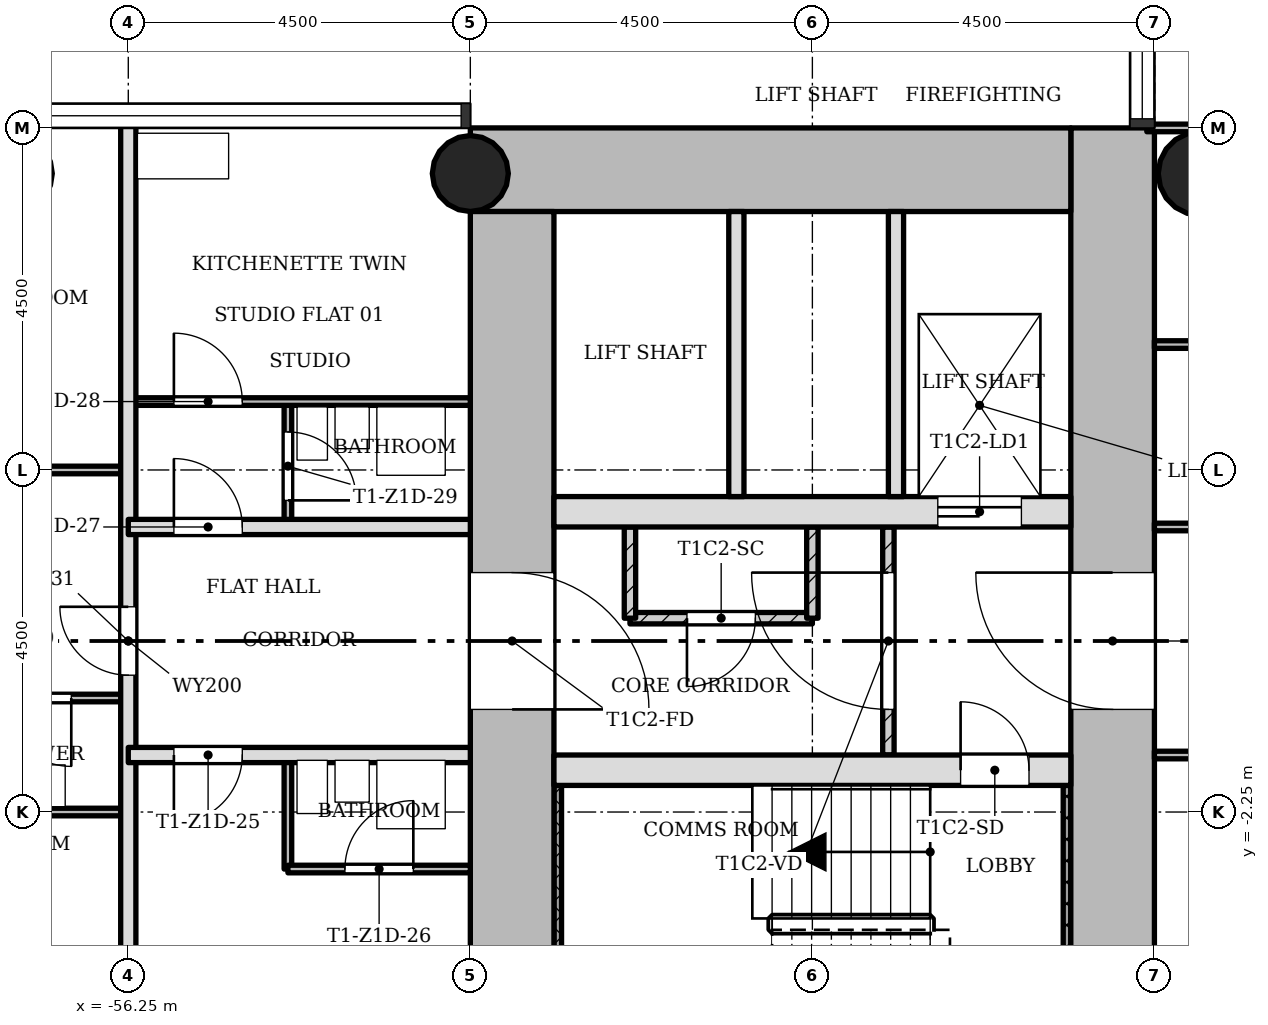
"""IFC4 building model, lengths in metres.
Left out: names, types, materials, properties, quantities, classifications, styles, units other than length and angle.
Written with IfcOpenShell. Run it as: python <this file> out.ifc"""

import sys

from ifc_helpers import new_model, si_unit, direction, frame, frame_2d, origin, origin_2d, place, context, subcontext, project, spatial, rectangle, hollow_circle, extrude, element, fill, save


model = new_model("IFC4")
c1 = context("Model", 3, precision=1e-05, world=origin(), true_north=direction((0.0, 1.0)))
c2 = subcontext(c1, "Body", "Model", "MODEL_VIEW")
j1 = project(units=[si_unit("LENGTHUNIT", "METRE"), si_unit("PLANEANGLEUNIT", "RADIAN")], contexts=[c1])
p1 = place(None, origin())
s1 = spatial("IfcSite", under=j1, at=p1, CompositionType="ELEMENT")
p2 = place(p1, origin())
s2 = spatial("IfcBuilding", under=s1, at=p2, CompositionType="ELEMENT")
p3 = place(p2, frame((0.0, 0.0, 61.9)))
s3 = spatial("IfcBuildingStorey", under=s2, at=p3, CompositionType="ELEMENT", Elevation=61.9)
p4 = place(p3, frame((-43.3, -5.65, 0.0), z_axis=(0.0, 0.0, 1.0), x_axis=(0.0, 1.0, 0.0)))
e1 = element("IfcWall", 1, at=p4, inside=s3, PredefinedType="SHEAR", context=c2, shape_type="SweptSolid", body=[
    extrude(rectangle(XDim=12.4, YDim=1.1, at=frame_2d((6.2, 0.0))), origin(), (0.0, 0.0, 1.0), 3.4),
])
p5 = place(p4, frame((4.75, 0.0, 0.0)))
e2 = element("IfcOpeningElement", 2, at=p5, cuts=e1, PredefinedType="OPENING", context=c2, shape_type="SweptSolid", body=[
    extrude(rectangle(XDim=1.8, YDim=2.1, at=frame_2d((0.9, 1.05))), frame((0.0, 0.56, 0.0), z_axis=(0.0, -1.0, 0.0), x_axis=(1.0, 0.0, 0.0)), (0.0, 0.0, 1.0), 1.12),
])
p6 = place(p3, frame((-43.85, 6.2, 0.0), z_axis=(0.0, 0.0, 1.0), x_axis=(-1.0, 0.0, 0.0)))
e3 = element("IfcWall", 3, at=p6, inside=s3, PredefinedType="SHEAR", context=c2, shape_type="SweptSolid", body=[
    extrude(rectangle(XDim=7.9, YDim=1.1, at=frame_2d((3.95, 0.0))), origin(), (0.0, 0.0, 1.0), 3.4),
])
p7 = place(p3, frame((-51.2, 5.65, 0.0), z_axis=(0.0, 0.0, 1.0), x_axis=(0.0, -1.0, 0.0)))
e4 = element("IfcWall", 4, at=p7, inside=s3, PredefinedType="SHEAR", context=c2, shape_type="SweptSolid", body=[
    extrude(rectangle(XDim=12.4, YDim=1.1, at=frame_2d((6.2, 0.0))), origin(), (0.0, 0.0, 1.0), 3.4),
])
p8 = place(p7, frame((4.75, 0.0, 0.0)))
e5 = element("IfcOpeningElement", 5, at=p8, cuts=e4, PredefinedType="OPENING", context=c2, shape_type="SweptSolid", body=[
    extrude(rectangle(XDim=1.8, YDim=2.1, at=frame_2d((0.9, 1.05))), frame((0.0, 0.56, 0.0), z_axis=(0.0, -1.0, 0.0), x_axis=(1.0, 0.0, 0.0)), (0.0, 0.0, 1.0), 1.12),
])
p9 = place(p3, frame((-50.65, -1.7, 0.0), z_axis=(0.0, 0.0, 1.0), x_axis=(1.0, 0.0, 0.0)))
e6 = element("IfcWall", 6, at=p9, inside=s3, PredefinedType="SHEAR", context=c2, shape_type="SweptSolid", body=[
    extrude(rectangle(XDim=6.8, YDim=0.4, at=frame_2d((3.4, 0.0))), origin(), (0.0, 0.0, 1.0), 3.4),
])
p10 = place(p9, frame((5.35, 0.0, 0.0)))
e7 = element("IfcOpeningElement", 7, at=p10, cuts=e6, PredefinedType="OPENING", context=c2, shape_type="SweptSolid", body=[
    extrude(rectangle(XDim=0.9, YDim=2.1, at=frame_2d((0.45, 1.05))), frame((0.0, 0.21, 0.0), z_axis=(0.0, -1.0, 0.0), x_axis=(1.0, 0.0, 0.0)), (0.0, 0.0, 1.0), 0.42),
])
p11 = place(p3, frame((-50.65, 1.7, 0.0), z_axis=(0.0, 0.0, 1.0), x_axis=(1.0, 0.0, 0.0)))
e8 = element("IfcWall", 8, at=p11, inside=s3, PredefinedType="SHEAR", context=c2, shape_type="SweptSolid", body=[
    extrude(rectangle(XDim=6.8, YDim=0.4, at=frame_2d((3.4, 0.0))), origin(), (0.0, 0.0, 1.0), 3.4),
])
p12 = place(p11, frame((5.05, 0.0, 0.0)))
e9 = element("IfcOpeningElement", 9, at=p12, cuts=e8, PredefinedType="OPENING", context=c2, shape_type="SweptSolid", body=[
    extrude(rectangle(XDim=1.1, YDim=2.1, at=frame_2d((0.55, 1.05))), frame((0.0, 0.21, 0.0), z_axis=(0.0, -1.0, 0.0), x_axis=(1.0, 0.0, 0.0)), (0.0, 0.0, 1.0), 0.42),
])
p13 = place(p3, frame((-51.75, 6.15, 0.0), z_axis=(0.0, 0.0, 1.0), x_axis=(1.0, 0.0, 0.0)))
e10 = element("IfcColumn", 10, at=p13, inside=s3, PredefinedType="COLUMN", context=c2, shape_type="SweptSolid", body=[
    extrude(hollow_circle(Radius=0.5, WallThickness=0.036, at=origin_2d()), origin(), (0.0, 0.0, 1.0), 3.4),
])
p14 = place(p3, frame((-42.15, 6.15, 0.0), z_axis=(0.0, 0.0, 1.0), x_axis=(1.0, 0.0, 0.0)))
e11 = element("IfcColumn", 11, at=p14, inside=s3, PredefinedType="COLUMN", context=c2, shape_type="SweptSolid", body=[
    extrude(hollow_circle(Radius=0.55, WallThickness=0.04, at=origin_2d()), origin(), (0.0, 0.0, 1.0), 3.4),
])
p15 = place(p3, frame((-46.25, 1.5, 0.0), z_axis=(0.0, 0.0, 1.0), x_axis=(0.0, -1.0, 0.0)))
e12 = element("IfcWall", 12, at=p15, inside=s3, PredefinedType="PARTITIONING", context=c2, shape_type="SweptSolid", body=[
    extrude(rectangle(XDim=3.0, YDim=0.15, at=frame_2d((1.5, 0.0))), origin(), (0.0, 0.0, 1.0), 3.0),
])
p16 = place(p15, frame((0.6, 0.0, 0.0)))
e13 = element("IfcOpeningElement", 13, at=p16, cuts=e12, PredefinedType="OPENING", context=c2, shape_type="SweptSolid", body=[
    extrude(rectangle(XDim=1.8, YDim=2.1, at=frame_2d((0.9, 1.05))), frame((0.0, 0.085, 0.0), z_axis=(0.0, -1.0, 0.0), x_axis=(1.0, 0.0, 0.0)), (0.0, 0.0, 1.0), 0.17),
])
for number, where, z_axis, x_axis in (
    (14, (-46.15, 5.65, 0.0), (0.0, 0.0, 1.0), (0.0, -1.0, 0.0)),
    (15, (-48.25, 5.65, 0.0), (0.0, 0.0, 1.0), (0.0, -1.0, 0.0)),
):
    element("IfcWall", number, at=place(p3, frame(where, z_axis=z_axis, x_axis=x_axis)), inside=s3, PredefinedType="SOLIDWALL", context=c2, shape_type="SweptSolid", body=[
        extrude(rectangle(XDim=3.75, YDim=0.2, at=frame_2d((1.875, 0.0))), origin(), (0.0, 0.0, 1.0), 3.0),
    ])
p17 = place(p3, frame((-47.25, 0.3, 0.0), z_axis=(0.0, 0.0, 1.0), x_axis=(-1.0, 0.0, 0.0)))
e16 = element("IfcWall", 16, at=p17, inside=s3, PredefinedType="PARTITIONING", context=c2, shape_type="SweptSolid", body=[
    extrude(rectangle(XDim=2.4, YDim=0.15, at=frame_2d((1.2, 0.0))), origin(), (0.0, 0.0, 1.0), 3.0),
])
p18 = place(p17, frame((0.75, 0.0, 0.0)))
e17 = element("IfcOpeningElement", 17, at=p18, cuts=e16, PredefinedType="OPENING", context=c2, shape_type="SweptSolid", body=[
    extrude(rectangle(XDim=0.9, YDim=2.1, at=frame_2d((0.45, 1.05))), frame((0.0, 0.085, 0.0), z_axis=(0.0, -1.0, 0.0), x_axis=(1.0, 0.0, 0.0)), (0.0, 0.0, 1.0), 0.17),
])
for number, where, z_axis, x_axis in (
    (18, (-47.25, 0.3, 0.0), (0.0, 0.0, 1.0), (0.0, 1.0, 0.0)),
    (19, (-49.65, 0.3, 0.0), (0.0, 0.0, 1.0), (0.0, 1.0, 0.0)),
):
    element("IfcWall", number, at=place(p3, frame(where, z_axis=z_axis, x_axis=x_axis)), inside=s3, PredefinedType="PARTITIONING", context=c2, shape_type="SweptSolid", body=[
        extrude(rectangle(XDim=1.2, YDim=0.15, at=frame_2d((0.6, 0.0))), origin(), (0.0, 0.0, 1.0), 3.0),
    ])
p19 = place(p3, frame((-56.25, -6.85, 0.0), z_axis=(0.0, 0.0, 1.0), x_axis=(0.0, 1.0, 0.0)))
e20 = element("IfcWall", 20, at=p19, inside=s3, PredefinedType="SOLIDWALL", context=c2, shape_type="SweptSolid", body=[
    extrude(rectangle(XDim=13.7, YDim=0.2, at=frame_2d((6.85, 0.0))), origin(), (0.0, 0.0, 1.0), 3.0),
])
p20 = place(p19, frame((6.4, 0.0, 0.0)))
e21 = element("IfcOpeningElement", 21, at=p20, cuts=e20, PredefinedType="OPENING", context=c2, shape_type="SweptSolid", body=[
    extrude(rectangle(XDim=0.9, YDim=2.1, at=frame_2d((0.45, 1.05))), frame((0.0, 0.11, 0.0), z_axis=(0.0, -1.0, 0.0), x_axis=(1.0, 0.0, 0.0)), (0.0, 0.0, 1.0), 0.22),
])
p21 = place(p3, frame((-54.15, -3.0, 0.0), z_axis=(0.0, 0.0, 1.0), x_axis=(0.0, 1.0, 0.0)))
e22 = element("IfcWall", 22, at=p21, inside=s3, PredefinedType="PARTITIONING", context=c2, shape_type="SweptSolid", body=[
    extrude(rectangle(XDim=1.5, YDim=0.1, at=frame_2d((0.75, 0.0))), origin(), (0.0, 0.0, 1.0), 3.0),
])
p22 = place(p3, frame((-54.15, 1.5, 0.0), z_axis=(0.0, 0.0, 1.0), x_axis=(0.0, 1.0, 0.0)))
e23 = element("IfcWall", 23, at=p22, inside=s3, PredefinedType="PARTITIONING", context=c2, shape_type="SweptSolid", body=[
    extrude(rectangle(XDim=1.65, YDim=0.1, at=frame_2d((0.825, 0.0))), origin(), (0.0, 0.0, 1.0), 3.0),
])
p23 = place(p22, frame((0.35, 0.0, 0.0)))
e24 = element("IfcOpeningElement", 24, at=p23, cuts=e23, PredefinedType="OPENING", context=c2, shape_type="SweptSolid", body=[
    extrude(rectangle(XDim=0.9, YDim=2.1, at=frame_2d((0.45, 1.05))), frame((0.0, 0.06, 0.0), z_axis=(0.0, -1.0, 0.0), x_axis=(1.0, 0.0, 0.0)), (0.0, 0.0, 1.0), 0.12),
])
p24 = place(p3, frame((-54.15, -3.0, 0.0), z_axis=(0.0, 0.0, 1.0), x_axis=(1.0, 0.0, 0.0)))
e25 = element("IfcWall", 25, at=p24, inside=s3, PredefinedType="PARTITIONING", context=c2, shape_type="SweptSolid", body=[
    extrude(rectangle(XDim=2.4, YDim=0.1, at=frame_2d((1.2, 0.0))), origin(), (0.0, 0.0, 1.0), 3.0),
])
p25 = place(p24, frame((0.75, 0.0, 0.0)))
e26 = element("IfcOpeningElement", 26, at=p25, cuts=e25, PredefinedType="OPENING", context=c2, shape_type="SweptSolid", body=[
    extrude(rectangle(XDim=0.9, YDim=2.1, at=frame_2d((0.45, 1.05))), frame((0.0, 0.06, 0.0), z_axis=(0.0, -1.0, 0.0), x_axis=(1.0, 0.0, 0.0)), (0.0, 0.0, 1.0), 0.12),
])
p26 = place(p3, frame((-60.85, -2.25, 0.0), z_axis=(0.0, 0.0, 1.0), x_axis=(1.0, 0.0, 0.0)))
e27 = element("IfcWall", 27, at=p26, inside=s3, PredefinedType="PARTITIONING", context=c2, shape_type="SweptSolid", body=[
    extrude(rectangle(XDim=4.6, YDim=0.1, at=frame_2d((2.3, 0.0))), origin(), (0.0, 0.0, 1.0), 3.0),
])
p27 = place(p26, frame((1.25, 0.0, 0.0)))
e28 = element("IfcOpeningElement", 28, at=p27, cuts=e27, PredefinedType="OPENING", context=c2, shape_type="SweptSolid", body=[
    extrude(rectangle(XDim=0.9, YDim=2.1, at=frame_2d((0.45, 1.05))), frame((0.0, 0.06, 0.0), z_axis=(0.0, -1.0, 0.0), x_axis=(1.0, 0.0, 0.0)), (0.0, 0.0, 1.0), 0.12),
])
p28 = place(p3, frame((-42.75, -1.5, 0.0), z_axis=(0.0, 0.0, 1.0), x_axis=(1.0, 0.0, 0.0)))
e29 = element("IfcWall", 29, at=p28, inside=s3, PredefinedType="PARTITIONING", context=c2, shape_type="SweptSolid", body=[
    extrude(rectangle(XDim=5.85, YDim=0.1, at=frame_2d((2.925, 0.0))), origin(), (0.0, 0.0, 1.0), 3.0),
])
p29 = place(p28, frame((2.475, 0.0, 0.0)))
e30 = element("IfcOpeningElement", 30, at=p29, cuts=e29, PredefinedType="OPENING", context=c2, shape_type="SweptSolid", body=[
    extrude(rectangle(XDim=0.9, YDim=2.1, at=frame_2d((0.45, 1.05))), frame((0.0, 0.06, 0.0), z_axis=(0.0, -1.0, 0.0), x_axis=(1.0, 0.0, 0.0)), (0.0, 0.0, 1.0), 0.12),
])
p30 = place(p3, frame((-56.25, -1.5, 0.0), z_axis=(0.0, 0.0, 1.0), x_axis=(1.0, 0.0, 0.0)))
e31 = element("IfcWall", 31, at=p30, inside=s3, PredefinedType="SOLIDWALL", context=c2, shape_type="SweptSolid", body=[
    extrude(rectangle(XDim=4.5, YDim=0.2, at=frame_2d((2.25, 0.0))), origin(), (0.0, 0.0, 1.0), 3.0),
])
p31 = place(p30, frame((0.6, 0.0, 0.0)))
e32 = element("IfcOpeningElement", 32, at=p31, cuts=e31, PredefinedType="OPENING", context=c2, shape_type="SweptSolid", body=[
    extrude(rectangle(XDim=0.9, YDim=2.1, at=frame_2d((0.45, 1.05))), frame((0.0, 0.11, 0.0), z_axis=(0.0, -1.0, 0.0), x_axis=(1.0, 0.0, 0.0)), (0.0, 0.0, 1.0), 0.22),
])
p32 = place(p3, frame((-58.65, -0.75, 0.0), z_axis=(0.0, 0.0, 1.0), x_axis=(1.0, 0.0, 0.0)))
e33 = element("IfcWall", 33, at=p32, inside=s3, PredefinedType="PARTITIONING", context=c2, shape_type="SweptSolid", body=[
    extrude(rectangle(XDim=2.4, YDim=0.1, at=frame_2d((1.2, 0.0))), origin(), (0.0, 0.0, 1.0), 3.0),
])
p33 = place(p32, frame((0.75, 0.0, 0.0)))
e34 = element("IfcOpeningElement", 34, at=p33, cuts=e33, PredefinedType="OPENING", context=c2, shape_type="SweptSolid", body=[
    extrude(rectangle(XDim=0.9, YDim=2.1, at=frame_2d((0.45, 1.05))), frame((0.0, 0.06, 0.0), z_axis=(0.0, -1.0, 0.0), x_axis=(1.0, 0.0, 0.0)), (0.0, 0.0, 1.0), 0.12),
])
p34 = place(p3, frame((-42.75, 1.5, 0.0), z_axis=(0.0, 0.0, 1.0), x_axis=(1.0, 0.0, 0.0)))
e35 = element("IfcWall", 35, at=p34, inside=s3, PredefinedType="PARTITIONING", context=c2, shape_type="SweptSolid", body=[
    extrude(rectangle(XDim=5.85, YDim=0.1, at=frame_2d((2.925, 0.0))), origin(), (0.0, 0.0, 1.0), 3.0),
])
p35 = place(p34, frame((1.575, 0.0, 0.0)))
e36 = element("IfcOpeningElement", 36, at=p35, cuts=e35, PredefinedType="OPENING", context=c2, shape_type="SweptSolid", body=[
    extrude(rectangle(XDim=0.9, YDim=2.1, at=frame_2d((0.45, 1.05))), frame((0.0, 0.06, 0.0), z_axis=(0.0, -1.0, 0.0), x_axis=(1.0, 0.0, 0.0)), (0.0, 0.0, 1.0), 0.12),
])
p36 = place(p3, frame((-56.25, 1.5, 0.0), z_axis=(0.0, 0.0, 1.0), x_axis=(1.0, 0.0, 0.0)))
e37 = element("IfcWall", 37, at=p36, inside=s3, PredefinedType="SOLIDWALL", context=c2, shape_type="SweptSolid", body=[
    extrude(rectangle(XDim=4.5, YDim=0.2, at=frame_2d((2.25, 0.0))), origin(), (0.0, 0.0, 1.0), 3.0),
])
p37 = place(p36, frame((0.6, 0.0, 0.0)))
e38 = element("IfcOpeningElement", 38, at=p37, cuts=e37, PredefinedType="OPENING", context=c2, shape_type="SweptSolid", body=[
    extrude(rectangle(XDim=0.9, YDim=2.1, at=frame_2d((0.45, 1.05))), frame((0.0, 0.11, 0.0), z_axis=(0.0, -1.0, 0.0), x_axis=(1.0, 0.0, 0.0)), (0.0, 0.0, 1.0), 0.22),
])
p38 = place(p3, frame((-60.85, 2.25, 0.0), z_axis=(0.0, 0.0, 1.0), x_axis=(1.0, 0.0, 0.0)))
e39 = element("IfcWall", 39, at=p38, inside=s3, PredefinedType="PARTITIONING", context=c2, shape_type="SweptSolid", body=[
    extrude(rectangle(XDim=4.6, YDim=0.1, at=frame_2d((2.3, 0.0))), origin(), (0.0, 0.0, 1.0), 3.0),
])
p39 = place(p38, frame((1.9, 0.0, 0.0)))
e40 = element("IfcOpeningElement", 40, at=p39, cuts=e39, PredefinedType="OPENING", context=c2, shape_type="SweptSolid", body=[
    extrude(rectangle(XDim=0.9, YDim=2.1, at=frame_2d((0.45, 1.05))), frame((0.0, 0.06, 0.0), z_axis=(0.0, -1.0, 0.0), x_axis=(1.0, 0.0, 0.0)), (0.0, 0.0, 1.0), 0.12),
])
p40 = place(p3, frame((-56.25, 3.15, 0.0), z_axis=(0.0, 0.0, 1.0), x_axis=(1.0, 0.0, 0.0)))
e41 = element("IfcWall", 41, at=p40, inside=s3, PredefinedType="PARTITIONING", context=c2, shape_type="SweptSolid", body=[
    extrude(rectangle(XDim=4.5, YDim=0.1, at=frame_2d((2.25, 0.0))), origin(), (0.0, 0.0, 1.0), 3.0),
])
p41 = place(p40, frame((0.6, 0.0, 0.0)))
e42 = element("IfcOpeningElement", 42, at=p41, cuts=e41, PredefinedType="OPENING", context=c2, shape_type="SweptSolid", body=[
    extrude(rectangle(XDim=0.9, YDim=2.1, at=frame_2d((0.45, 1.05))), frame((0.0, 0.06, 0.0), z_axis=(0.0, -1.0, 0.0), x_axis=(1.0, 0.0, 0.0)), (0.0, 0.0, 1.0), 0.12),
])
p42 = place(p3, frame((-42.75, 3.9, 0.0), z_axis=(0.0, 0.0, 1.0), x_axis=(1.0, 0.0, 0.0)))
e43 = element("IfcWall", 43, at=p42, inside=s3, PredefinedType="PARTITIONING", context=c2, shape_type="SweptSolid", body=[
    extrude(rectangle(XDim=5.85, YDim=0.1, at=frame_2d((2.925, 0.0))), origin(), (0.0, 0.0, 1.0), 3.0),
])
p43 = place(p3, frame((-42.85, 6.75, 0.0), z_axis=(0.0, 0.0, 1.0), x_axis=(1.0, 0.0, 0.0)))
e44 = element("IfcWall", 44, at=p43, inside=s3, PredefinedType="PARTITIONING", context=c2, shape_type="SweptSolid", body=[
    extrude(rectangle(XDim=5.95, YDim=0.1, at=frame_2d((2.975, 0.0))), origin(), (0.0, 0.0, 1.0), 3.0),
])
for number, where, z_axis, x_axis in (
    (45, (-50.6, -1.9, 0.0), (0.0, 0.0, 1.0), (0.0, -1.0, 0.0)),
    (46, (-43.9, -1.9, 0.0), (0.0, 0.0, 1.0), (0.0, -1.0, 0.0)),
):
    element("IfcWall", number, at=place(p3, frame(where, z_axis=z_axis, x_axis=x_axis)), inside=s3, PredefinedType="SHEAR", context=c2, shape_type="SweptSolid", body=[
        extrude(rectangle(XDim=3.75, YDim=0.1, at=frame_2d((1.875, 0.0))), origin(), (0.0, 0.0, 1.0), 3.4),
    ])
p44 = place(p16, origin())
e47 = element("IfcDoor", 47, at=p44, inside=s3, OperationType="SINGLE_SWING_LEFT", PredefinedType="DOOR", context=c2, shape_type="SweptSolid", body=[
    extrude(rectangle(XDim=1.8, YDim=2.1, at=frame_2d((0.9, 1.05))), frame((0.0, 0.025, 0.0), z_axis=(0.0, -1.0, 0.0), x_axis=(1.0, 0.0, 0.0)), (0.0, 0.0, 1.0), 0.05),
])
fill(e13, e47)
p45 = place(p18, origin())
e48 = element("IfcDoor", 48, at=p45, inside=s3, OperationType="SINGLE_SWING_LEFT", PredefinedType="DOOR", context=c2, shape_type="SweptSolid", body=[
    extrude(rectangle(XDim=0.9, YDim=2.1, at=frame_2d((0.45, 1.05))), frame((0.0, 0.025, 0.0), z_axis=(0.0, -1.0, 0.0), x_axis=(1.0, 0.0, 0.0)), (0.0, 0.0, 1.0), 0.05),
])
fill(e17, e48)
p46 = place(p31, origin())
e49 = element("IfcDoor", 49, at=p46, inside=s3, OperationType="SINGLE_SWING_LEFT", PredefinedType="DOOR", context=c2, shape_type="SweptSolid", body=[
    extrude(rectangle(XDim=0.9, YDim=2.1, at=frame_2d((0.45, 1.05))), frame((0.0, 0.025, 0.0), z_axis=(0.0, -1.0, 0.0), x_axis=(1.0, 0.0, 0.0)), (0.0, 0.0, 1.0), 0.05),
])
fill(e32, e49)
p47 = place(p25, origin())
e50 = element("IfcDoor", 50, at=p47, inside=s3, OperationType="SINGLE_SWING_LEFT", PredefinedType="DOOR", context=c2, shape_type="SweptSolid", body=[
    extrude(rectangle(XDim=0.9, YDim=2.1, at=frame_2d((0.45, 1.05))), frame((0.0, 0.025, 0.0), z_axis=(0.0, -1.0, 0.0), x_axis=(1.0, 0.0, 0.0)), (0.0, 0.0, 1.0), 0.05),
])
fill(e26, e50)
p48 = place(p37, origin())
e51 = element("IfcDoor", 51, at=p48, inside=s3, OperationType="SINGLE_SWING_RIGHT", PredefinedType="DOOR", context=c2, shape_type="SweptSolid", body=[
    extrude(rectangle(XDim=0.9, YDim=2.1, at=frame_2d((0.45, 1.05))), frame((0.0, 0.025, 0.0), z_axis=(0.0, -1.0, 0.0), x_axis=(1.0, 0.0, 0.0)), (0.0, 0.0, 1.0), 0.05),
])
fill(e38, e51)
p49 = place(p41, origin())
e52 = element("IfcDoor", 52, at=p49, inside=s3, OperationType="SINGLE_SWING_RIGHT", PredefinedType="DOOR", context=c2, shape_type="SweptSolid", body=[
    extrude(rectangle(XDim=0.9, YDim=2.1, at=frame_2d((0.45, 1.05))), frame((0.0, 0.025, 0.0), z_axis=(0.0, -1.0, 0.0), x_axis=(1.0, 0.0, 0.0)), (0.0, 0.0, 1.0), 0.05),
])
fill(e42, e52)
p50 = place(p23, origin())
e53 = element("IfcDoor", 53, at=p50, inside=s3, OperationType="SINGLE_SWING_LEFT", PredefinedType="DOOR", context=c2, shape_type="SweptSolid", body=[
    extrude(rectangle(XDim=0.9, YDim=2.1, at=frame_2d((0.45, 1.05))), frame((0.0, 0.025, 0.0), z_axis=(0.0, -1.0, 0.0), x_axis=(1.0, 0.0, 0.0)), (0.0, 0.0, 1.0), 0.05),
])
fill(e24, e53)
p51 = place(p33, origin())
e54 = element("IfcDoor", 54, at=p51, inside=s3, OperationType="SINGLE_SWING_RIGHT", PredefinedType="DOOR", context=c2, shape_type="SweptSolid", body=[
    extrude(rectangle(XDim=0.9, YDim=2.1, at=frame_2d((0.45, 1.05))), frame((0.0, 0.025, 0.0), z_axis=(0.0, -1.0, 0.0), x_axis=(1.0, 0.0, 0.0)), (0.0, 0.0, 1.0), 0.05),
])
fill(e34, e54)
p52 = place(p20, origin())
e55 = element("IfcDoor", 55, at=p52, inside=s3, OperationType="SINGLE_SWING_LEFT", PredefinedType="DOOR", context=c2, shape_type="SweptSolid", body=[
    extrude(rectangle(XDim=0.9, YDim=2.1, at=frame_2d((0.45, 1.05))), frame((0.0, 0.025, 0.0), z_axis=(0.0, -1.0, 0.0), x_axis=(1.0, 0.0, 0.0)), (0.0, 0.0, 1.0), 0.05),
])
fill(e21, e55)
p53 = place(p10, origin())
e56 = element("IfcDoor", 56, at=p53, inside=s3, OperationType="SINGLE_SWING_RIGHT", PredefinedType="DOOR", context=c2, shape_type="SweptSolid", body=[
    extrude(rectangle(XDim=0.9, YDim=2.1, at=frame_2d((0.45, 1.05))), frame((0.0, 0.025, 0.0), z_axis=(0.0, -1.0, 0.0), x_axis=(1.0, 0.0, 0.0)), (0.0, 0.0, 1.0), 0.05),
])
fill(e7, e56)
p54 = place(p12, origin())
e57 = element("IfcDoor", 57, at=p54, inside=s3, OperationType="SLIDING_TO_LEFT", PredefinedType="DOOR", context=c2, shape_type="SweptSolid", body=[
    extrude(rectangle(XDim=1.1, YDim=2.1, at=frame_2d((0.55, 1.05))), frame((0.0, 0.025, 0.0), z_axis=(0.0, -1.0, 0.0), x_axis=(1.0, 0.0, 0.0)), (0.0, 0.0, 1.0), 0.05),
])
fill(e9, e57)
p55 = place(p5, origin())
e58 = element("IfcDoor", 58, at=p55, inside=s3, OperationType="SINGLE_SWING_LEFT", PredefinedType="DOOR", context=c2, shape_type="SweptSolid", body=[
    extrude(rectangle(XDim=1.8, YDim=2.1, at=frame_2d((0.9, 1.05))), frame((0.0, 0.025, 0.0), z_axis=(0.0, -1.0, 0.0), x_axis=(1.0, 0.0, 0.0)), (0.0, 0.0, 1.0), 0.05),
])
fill(e2, e58)
p56 = place(p8, origin())
e59 = element("IfcDoor", 59, at=p56, inside=s3, OperationType="SINGLE_SWING_LEFT", PredefinedType="DOOR", context=c2, shape_type="SweptSolid", body=[
    extrude(rectangle(XDim=1.8, YDim=2.1, at=frame_2d((0.9, 1.05))), frame((0.0, 0.025, 0.0), z_axis=(0.0, -1.0, 0.0), x_axis=(1.0, 0.0, 0.0)), (0.0, 0.0, 1.0), 0.05),
])
fill(e5, e59)
save(model, sys.argv[1])
